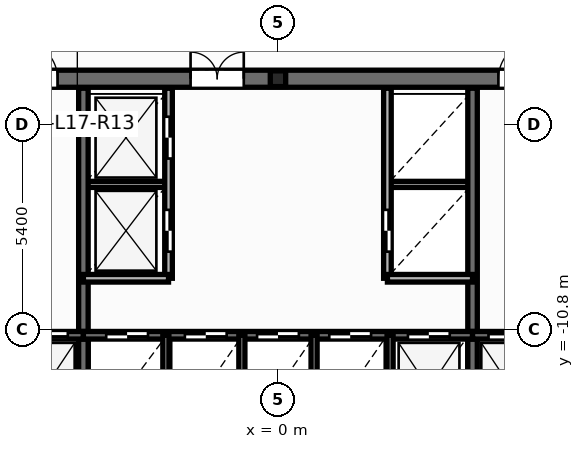
"""IFC4 building model, lengths in metres.
Left out: names, types, materials, properties, quantities, classifications, styles, units other than length and angle.
Written with IfcOpenShell. Run it as: python <this file> out.ifc"""

import sys

from ifc_helpers import new_model, si_unit, direction, frame, frame_2d, origin, origin_2d, place, context, subcontext, project, spatial, rectangle, i_section, extrude, element, fill, save


model = new_model("IFC4")
c1 = context("Model", 3, precision=1e-05, world=origin(), true_north=direction((0.0, 1.0)))
c2 = subcontext(c1, "Body", "Model", "MODEL_VIEW")
j1 = project(units=[si_unit("LENGTHUNIT", "METRE"), si_unit("PLANEANGLEUNIT", "RADIAN")], contexts=[c1])
p1 = place(None, origin())
s1 = spatial("IfcSite", under=j1, at=p1, CompositionType="ELEMENT")
p2 = place(p1, origin())
s2 = spatial("IfcBuilding", under=s1, at=p2, CompositionType="ELEMENT")
p3 = place(p2, frame((0.0, 0.0, 68.4)))
s3 = spatial("IfcBuildingStorey", under=s2, at=p3, CompositionType="ELEMENT", Elevation=68.4)
p4 = place(p3, frame((0.0, -4.2, 0.0), z_axis=(0.0, 0.0, 1.0), x_axis=(1.0, 0.0, 0.0)))
e1 = element("IfcColumn", 1, at=p4, inside=s3, PredefinedType="PILASTER", context=c2, shape_type="SweptSolid", body=[
    extrude(i_section(OverallWidth=0.405, OverallDepth=0.414, WebThickness=0.022, FlangeThickness=0.032, at=origin_2d()), origin(), (0.0, 0.0, 1.0), 3.6),
])
for number, where, z_axis, x_axis in (
    (2, (-5.12, -6.98, 0.0), (0.0, 0.0, 1.0), (1.0, 0.0, 0.0)),
    (3, (2.88, -6.98, 0.0), (0.0, 0.0, 1.0), (1.0, 0.0, 0.0)),
):
    element("IfcWall", number, at=place(p3, frame(where, z_axis=z_axis, x_axis=x_axis)), inside=s3, PredefinedType="PARTITIONING", context=c2, shape_type="SweptSolid", body=[
        extrude(rectangle(XDim=2.24, YDim=0.16, at=frame_2d((1.12, 0.0))), origin(), (0.0, 0.0, 1.0), 3.35),
    ])
p5 = place(p3, frame((-12.65, -4.2, 0.0), z_axis=(0.0, 0.0, 1.0), x_axis=(1.0, 0.0, 0.0)))
e4 = element("IfcWall", 4, at=p5, inside=s3, PredefinedType="SHEAR", context=c2, shape_type="SweptSolid", body=[
    extrude(rectangle(XDim=25.3, YDim=0.45, at=frame_2d((12.65, 0.0))), origin(), (0.0, 0.0, 1.0), 3.6),
])
p6 = place(p5, frame((0.95, 0.0, 0.0)))
e5 = element("IfcOpeningElement", 5, at=p6, cuts=e4, PredefinedType="OPENING", context=c2, shape_type="SweptSolid", body=[
    extrude(rectangle(XDim=0.756, YDim=2.054, at=frame_2d((0.375, 1.027))), frame((0.0, 0.235, 0.0), z_axis=(0.0, -1.0, 0.0), x_axis=(1.0, 0.0, 0.0)), (0.0, 0.0, 1.0), 0.47),
])
p7 = place(p5, frame((2.6, 0.0, 0.0)))
e6 = element("IfcOpeningElement", 6, at=p7, cuts=e4, PredefinedType="OPENING", context=c2, shape_type="SweptSolid", body=[
    extrude(rectangle(XDim=0.756, YDim=2.054, at=frame_2d((0.375, 1.027))), frame((0.0, 0.235, 0.0), z_axis=(0.0, -1.0, 0.0), x_axis=(1.0, 0.0, 0.0)), (0.0, 0.0, 1.0), 0.47),
])
p8 = place(p5, frame((21.85, 0.0, 0.0)))
e7 = element("IfcOpeningElement", 7, at=p8, cuts=e4, PredefinedType="OPENING", context=c2, shape_type="SweptSolid", body=[
    extrude(rectangle(XDim=0.756, YDim=2.054, at=frame_2d((0.375, 1.027))), frame((0.0, 0.235, 0.0), z_axis=(0.0, -1.0, 0.0), x_axis=(1.0, 0.0, 0.0)), (0.0, 0.0, 1.0), 0.47),
])
p9 = place(p5, frame((23.5, 0.0, 0.0)))
e8 = element("IfcOpeningElement", 8, at=p9, cuts=e4, PredefinedType="OPENING", context=c2, shape_type="SweptSolid", body=[
    extrude(rectangle(XDim=0.756, YDim=2.054, at=frame_2d((0.375, 1.027))), frame((0.0, 0.235, 0.0), z_axis=(0.0, -1.0, 0.0), x_axis=(1.0, 0.0, 0.0)), (0.0, 0.0, 1.0), 0.47),
])
p10 = place(p5, frame((5.85, 0.0, 0.0)))
e9 = element("IfcOpeningElement", 9, at=p10, cuts=e4, PredefinedType="OPENING", context=c2, shape_type="SweptSolid", body=[
    extrude(rectangle(XDim=1.006, YDim=2.104, at=frame_2d((0.5, 1.052))), frame((0.0, 0.235, 0.0), z_axis=(0.0, -1.0, 0.0), x_axis=(1.0, 0.0, 0.0)), (0.0, 0.0, 1.0), 0.47),
])
p11 = place(p5, frame((10.35, 0.0, 0.0)))
e10 = element("IfcOpeningElement", 10, at=p11, cuts=e4, PredefinedType="OPENING", context=c2, shape_type="SweptSolid", body=[
    extrude(rectangle(XDim=1.406, YDim=2.154, at=frame_2d((0.7, 1.077))), frame((0.0, 0.235, 0.0), z_axis=(0.0, -1.0, 0.0), x_axis=(1.0, 0.0, 0.0)), (0.0, 0.0, 1.0), 0.47),
])
p12 = place(p5, frame((18.45, 0.0, 0.0)))
e11 = element("IfcOpeningElement", 11, at=p12, cuts=e4, PredefinedType="OPENING", context=c2, shape_type="SweptSolid", body=[
    extrude(rectangle(XDim=1.006, YDim=2.104, at=frame_2d((0.5, 1.052))), frame((0.0, 0.235, 0.0), z_axis=(0.0, -1.0, 0.0), x_axis=(1.0, 0.0, 0.0)), (0.0, 0.0, 1.0), 0.47),
])
for number, where, z_axis, x_axis in (
    (12, (-5.12, -13.85, 0.0), (0.0, 0.0, 1.0), (0.0, 1.0, 0.0)),
    (13, (5.12, -13.85, 0.0), (0.0, 0.0, 1.0), (0.0, 1.0, 0.0)),
):
    element("IfcWall", number, at=place(p3, frame(where, z_axis=z_axis, x_axis=x_axis)), inside=s3, PredefinedType="SHEAR", context=c2, shape_type="SweptSolid", body=[
        extrude(rectangle(XDim=9.4, YDim=0.25, at=frame_2d((4.7, 0.0))), origin(), (0.0, 0.0, 1.0), 3.6),
    ])
p13 = place(p3, frame((-8.48, -10.95, 0.0), z_axis=(0.0, 0.0, 1.0), x_axis=(1.0, 0.0, 0.0)))
e14 = element("IfcWall", 14, at=p13, inside=s3, PredefinedType="SOLIDWALL", context=c2, shape_type="SweptSolid", body=[
    extrude(rectangle(XDim=3.36, YDim=0.2, at=frame_2d((1.68, 0.0))), origin(), (0.0, 0.0, 1.0), 3.6),
])
p14 = place(p13, frame((0.28, 0.0, 0.0)))
e15 = element("IfcOpeningElement", 15, at=p14, cuts=e14, PredefinedType="OPENING", context=c2, shape_type="SweptSolid", body=[
    extrude(rectangle(XDim=0.756, YDim=2.054, at=frame_2d((0.375, 1.027))), frame((0.0, 0.11, 0.0), z_axis=(0.0, -1.0, 0.0), x_axis=(1.0, 0.0, 0.0)), (0.0, 0.0, 1.0), 0.22),
])
p15 = place(p13, frame((1.85, 0.0, 0.0)))
e16 = element("IfcOpeningElement", 16, at=p15, cuts=e14, PredefinedType="OPENING", context=c2, shape_type="SweptSolid", body=[
    extrude(rectangle(XDim=1.106, YDim=2.104, at=frame_2d((0.55, 1.052))), frame((0.0, 0.11, 0.0), z_axis=(0.0, -1.0, 0.0), x_axis=(1.0, 0.0, 0.0)), (0.0, 0.0, 1.0), 0.22),
])
p16 = place(p3, frame((-5.12, -10.95, 0.0), z_axis=(0.0, 0.0, 1.0), x_axis=(1.0, 0.0, 0.0)))
e17 = element("IfcWall", 17, at=p16, inside=s3, PredefinedType="SOLIDWALL", context=c2, shape_type="SweptSolid", body=[
    extrude(rectangle(XDim=10.24, YDim=0.2, at=frame_2d((5.12, 0.0))), origin(), (0.0, 0.0, 1.0), 3.6),
])
p17 = place(p16, frame((0.6, 0.0, 0.0)))
e18 = element("IfcOpeningElement", 18, at=p17, cuts=e17, PredefinedType="OPENING", context=c2, shape_type="SweptSolid", body=[
    extrude(rectangle(XDim=1.106, YDim=2.104, at=frame_2d((0.55, 1.052))), frame((0.0, 0.11, 0.0), z_axis=(0.0, -1.0, 0.0), x_axis=(1.0, 0.0, 0.0)), (0.0, 0.0, 1.0), 0.22),
])
p18 = place(p16, frame((2.67, 0.0, 0.0)))
e19 = element("IfcOpeningElement", 19, at=p18, cuts=e17, PredefinedType="OPENING", context=c2, shape_type="SweptSolid", body=[
    extrude(rectangle(XDim=1.106, YDim=2.104, at=frame_2d((0.55, 1.052))), frame((0.0, 0.11, 0.0), z_axis=(0.0, -1.0, 0.0), x_axis=(1.0, 0.0, 0.0)), (0.0, 0.0, 1.0), 0.22),
])
p19 = place(p16, frame((4.57, 0.0, 0.0)))
e20 = element("IfcOpeningElement", 20, at=p19, cuts=e17, PredefinedType="OPENING", context=c2, shape_type="SweptSolid", body=[
    extrude(rectangle(XDim=1.106, YDim=2.104, at=frame_2d((0.55, 1.052))), frame((0.0, 0.11, 0.0), z_axis=(0.0, -1.0, 0.0), x_axis=(1.0, 0.0, 0.0)), (0.0, 0.0, 1.0), 0.22),
])
p20 = place(p16, frame((6.47, 0.0, 0.0)))
e21 = element("IfcOpeningElement", 21, at=p20, cuts=e17, PredefinedType="OPENING", context=c2, shape_type="SweptSolid", body=[
    extrude(rectangle(XDim=1.106, YDim=2.104, at=frame_2d((0.55, 1.052))), frame((0.0, 0.11, 0.0), z_axis=(0.0, -1.0, 0.0), x_axis=(1.0, 0.0, 0.0)), (0.0, 0.0, 1.0), 0.22),
])
p21 = place(p16, frame((8.54, 0.0, 0.0)))
e22 = element("IfcOpeningElement", 22, at=p21, cuts=e17, PredefinedType="OPENING", context=c2, shape_type="SweptSolid", body=[
    extrude(rectangle(XDim=1.106, YDim=2.104, at=frame_2d((0.55, 1.052))), frame((0.0, 0.11, 0.0), z_axis=(0.0, -1.0, 0.0), x_axis=(1.0, 0.0, 0.0)), (0.0, 0.0, 1.0), 0.22),
])
p22 = place(p3, frame((5.12, -10.95, 0.0), z_axis=(0.0, 0.0, 1.0), x_axis=(1.0, 0.0, 0.0)))
e23 = element("IfcWall", 23, at=p22, inside=s3, PredefinedType="SOLIDWALL", context=c2, shape_type="SweptSolid", body=[
    extrude(rectangle(XDim=3.36, YDim=0.2, at=frame_2d((1.68, 0.0))), origin(), (0.0, 0.0, 1.0), 3.6),
])
p23 = place(p22, frame((0.42, 0.0, 0.0)))
e24 = element("IfcOpeningElement", 24, at=p23, cuts=e23, PredefinedType="OPENING", context=c2, shape_type="SweptSolid", body=[
    extrude(rectangle(XDim=1.106, YDim=2.104, at=frame_2d((0.55, 1.052))), frame((0.0, 0.11, 0.0), z_axis=(0.0, -1.0, 0.0), x_axis=(1.0, 0.0, 0.0)), (0.0, 0.0, 1.0), 0.22),
])
p24 = place(p22, frame((2.3, 0.0, 0.0)))
e25 = element("IfcOpeningElement", 25, at=p24, cuts=e23, PredefinedType="OPENING", context=c2, shape_type="SweptSolid", body=[
    extrude(rectangle(XDim=0.756, YDim=2.054, at=frame_2d((0.375, 1.027))), frame((0.0, 0.11, 0.0), z_axis=(0.0, -1.0, 0.0), x_axis=(1.0, 0.0, 0.0)), (0.0, 0.0, 1.0), 0.22),
])
for number, where, z_axis, x_axis in (
    (26, (-2.95, -13.85, 0.0), (0.0, 0.0, 1.0), (0.0, 1.0, 0.0)),
    (27, (2.95, -13.85, 0.0), (0.0, 0.0, 1.0), (0.0, 1.0, 0.0)),
):
    element("IfcWall", number, at=place(p3, frame(where, z_axis=z_axis, x_axis=x_axis)), inside=s3, PredefinedType="PARTITIONING", context=c2, shape_type="SweptSolid", body=[
        extrude(rectangle(XDim=2.9, YDim=0.16, at=frame_2d((1.45, 0.0))), origin(), (0.0, 0.0, 1.0), 2.375),
    ])
p25 = place(p3, frame((-2.88, -9.45, 0.0), z_axis=(0.0, 0.0, 1.0), x_axis=(0.0, 1.0, 0.0)))
e28 = element("IfcWall", 28, at=p25, inside=s3, PredefinedType="SOLIDWALL", context=c2, shape_type="SweptSolid", body=[
    extrude(rectangle(XDim=5.0, YDim=0.2, at=frame_2d((2.5, 0.0))), origin(), (0.0, 0.0, 1.0), 3.35),
])
p26 = place(p25, frame((0.7, 0.0, 0.0)))
e29 = element("IfcOpeningElement", 29, at=p26, cuts=e28, PredefinedType="OPENING", context=c2, shape_type="SweptSolid", body=[
    extrude(rectangle(XDim=1.106, YDim=2.104, at=frame_2d((0.55, 1.052))), frame((0.0, 0.11, 0.0), z_axis=(0.0, -1.0, 0.0), x_axis=(1.0, 0.0, 0.0)), (0.0, 0.0, 1.0), 0.22),
])
p27 = place(p25, frame((3.15, 0.0, 0.0)))
e30 = element("IfcOpeningElement", 30, at=p27, cuts=e28, PredefinedType="OPENING", context=c2, shape_type="SweptSolid", body=[
    extrude(rectangle(XDim=1.106, YDim=2.104, at=frame_2d((0.55, 1.052))), frame((0.0, 0.11, 0.0), z_axis=(0.0, -1.0, 0.0), x_axis=(1.0, 0.0, 0.0)), (0.0, 0.0, 1.0), 0.22),
])
p28 = place(p3, frame((-5.12, -9.45, 0.0), z_axis=(0.0, 0.0, 1.0), x_axis=(1.0, 0.0, 0.0)))
e31 = element("IfcWall", 31, at=p28, inside=s3, PredefinedType="SOLIDWALL", context=c2, shape_type="SweptSolid", body=[
    extrude(rectangle(XDim=2.24, YDim=0.2, at=frame_2d((1.12, 0.0))), origin(), (0.0, 0.0, 1.0), 3.35),
])
p29 = place(p3, frame((2.88, -9.45, 0.0), z_axis=(0.0, 0.0, 1.0), x_axis=(0.0, 1.0, 0.0)))
e32 = element("IfcWall", 32, at=p29, inside=s3, PredefinedType="SOLIDWALL", context=c2, shape_type="SweptSolid", body=[
    extrude(rectangle(XDim=5.0, YDim=0.2, at=frame_2d((2.5, 0.0))), origin(), (0.0, 0.0, 1.0), 3.35),
])
p30 = place(p29, frame((0.7, 0.0, 0.0)))
e33 = element("IfcOpeningElement", 33, at=p30, cuts=e32, PredefinedType="OPENING", context=c2, shape_type="SweptSolid", body=[
    extrude(rectangle(XDim=1.106, YDim=2.104, at=frame_2d((0.55, 1.052))), frame((0.0, 0.11, 0.0), z_axis=(0.0, -1.0, 0.0), x_axis=(1.0, 0.0, 0.0)), (0.0, 0.0, 1.0), 0.22),
])
p31 = place(p3, frame((2.88, -9.45, 0.0), z_axis=(0.0, 0.0, 1.0), x_axis=(1.0, 0.0, 0.0)))
e34 = element("IfcWall", 34, at=p31, inside=s3, PredefinedType="SOLIDWALL", context=c2, shape_type="SweptSolid", body=[
    extrude(rectangle(XDim=2.24, YDim=0.2, at=frame_2d((1.12, 0.0))), origin(), (0.0, 0.0, 1.0), 3.35),
])
for number, where, z_axis, x_axis in (
    (35, (-0.95, -13.85, 0.0), (0.0, 0.0, 1.0), (0.0, 1.0, 0.0)),
    (36, (0.95, -13.85, 0.0), (0.0, 0.0, 1.0), (0.0, 1.0, 0.0)),
):
    element("IfcWall", number, at=place(p3, frame(where, z_axis=z_axis, x_axis=x_axis)), inside=s3, PredefinedType="PARTITIONING", context=c2, shape_type="SweptSolid", body=[
        extrude(rectangle(XDim=2.9, YDim=0.16, at=frame_2d((1.45, 0.0))), origin(), (0.0, 0.0, 1.0), 2.375),
    ])
p32 = place(p26, origin())
e37 = element("IfcDoor", 37, at=p32, inside=s3, OperationType="DOUBLE_DOOR_SLIDING", PredefinedType="DOOR", context=c2, shape_type="SweptSolid", body=[
    extrude(rectangle(XDim=1.1, YDim=2.1, at=frame_2d((0.55, 1.05))), frame((0.0, 0.025, 0.0), z_axis=(0.0, -1.0, 0.0), x_axis=(1.0, 0.0, 0.0)), (0.0, 0.0, 1.0), 0.05),
])
fill(e29, e37)
p33 = place(p27, origin())
e38 = element("IfcDoor", 38, at=p33, inside=s3, OperationType="DOUBLE_DOOR_SLIDING", PredefinedType="DOOR", context=c2, shape_type="SweptSolid", body=[
    extrude(rectangle(XDim=1.1, YDim=2.1, at=frame_2d((0.55, 1.05))), frame((0.0, 0.025, 0.0), z_axis=(0.0, -1.0, 0.0), x_axis=(1.0, 0.0, 0.0)), (0.0, 0.0, 1.0), 0.05),
])
fill(e30, e38)
p34 = place(p30, origin())
e39 = element("IfcDoor", 39, at=p34, inside=s3, OperationType="DOUBLE_DOOR_SLIDING", PredefinedType="DOOR", context=c2, shape_type="SweptSolid", body=[
    extrude(rectangle(XDim=1.1, YDim=2.1, at=frame_2d((0.55, 1.05))), frame((0.0, 0.025, 0.0), z_axis=(0.0, -1.0, 0.0), x_axis=(1.0, 0.0, 0.0)), (0.0, 0.0, 1.0), 0.05),
])
fill(e33, e39)
p35 = place(p15, origin())
e40 = element("IfcDoor", 40, at=p35, inside=s3, OperationType="DOUBLE_DOOR_SLIDING", PredefinedType="DOOR", context=c2, shape_type="SweptSolid", body=[
    extrude(rectangle(XDim=1.1, YDim=2.1, at=frame_2d((0.55, 1.05))), frame((0.0, 0.025, 0.0), z_axis=(0.0, -1.0, 0.0), x_axis=(1.0, 0.0, 0.0)), (0.0, 0.0, 1.0), 0.05),
])
fill(e16, e40)
p36 = place(p23, origin())
e41 = element("IfcDoor", 41, at=p36, inside=s3, OperationType="DOUBLE_DOOR_SLIDING", PredefinedType="DOOR", context=c2, shape_type="SweptSolid", body=[
    extrude(rectangle(XDim=1.1, YDim=2.1, at=frame_2d((0.55, 1.05))), frame((0.0, 0.025, 0.0), z_axis=(0.0, -1.0, 0.0), x_axis=(1.0, 0.0, 0.0)), (0.0, 0.0, 1.0), 0.05),
])
fill(e24, e41)
p37 = place(p17, origin())
e42 = element("IfcDoor", 42, at=p37, inside=s3, OperationType="DOUBLE_DOOR_SLIDING", PredefinedType="DOOR", context=c2, shape_type="SweptSolid", body=[
    extrude(rectangle(XDim=1.1, YDim=2.1, at=frame_2d((0.55, 1.05))), frame((0.0, 0.025, 0.0), z_axis=(0.0, -1.0, 0.0), x_axis=(1.0, 0.0, 0.0)), (0.0, 0.0, 1.0), 0.05),
])
fill(e18, e42)
p38 = place(p18, origin())
e43 = element("IfcDoor", 43, at=p38, inside=s3, OperationType="DOUBLE_DOOR_SLIDING", PredefinedType="DOOR", context=c2, shape_type="SweptSolid", body=[
    extrude(rectangle(XDim=1.1, YDim=2.1, at=frame_2d((0.55, 1.05))), frame((0.0, 0.025, 0.0), z_axis=(0.0, -1.0, 0.0), x_axis=(1.0, 0.0, 0.0)), (0.0, 0.0, 1.0), 0.05),
])
fill(e19, e43)
p39 = place(p19, origin())
e44 = element("IfcDoor", 44, at=p39, inside=s3, OperationType="DOUBLE_DOOR_SLIDING", PredefinedType="DOOR", context=c2, shape_type="SweptSolid", body=[
    extrude(rectangle(XDim=1.1, YDim=2.1, at=frame_2d((0.55, 1.05))), frame((0.0, 0.025, 0.0), z_axis=(0.0, -1.0, 0.0), x_axis=(1.0, 0.0, 0.0)), (0.0, 0.0, 1.0), 0.05),
])
fill(e20, e44)
p40 = place(p20, origin())
e45 = element("IfcDoor", 45, at=p40, inside=s3, OperationType="DOUBLE_DOOR_SLIDING", PredefinedType="DOOR", context=c2, shape_type="SweptSolid", body=[
    extrude(rectangle(XDim=1.1, YDim=2.1, at=frame_2d((0.55, 1.05))), frame((0.0, 0.025, 0.0), z_axis=(0.0, -1.0, 0.0), x_axis=(1.0, 0.0, 0.0)), (0.0, 0.0, 1.0), 0.05),
])
fill(e21, e45)
p41 = place(p21, origin())
e46 = element("IfcDoor", 46, at=p41, inside=s3, OperationType="DOUBLE_DOOR_SLIDING", PredefinedType="DOOR", context=c2, shape_type="SweptSolid", body=[
    extrude(rectangle(XDim=1.1, YDim=2.1, at=frame_2d((0.55, 1.05))), frame((0.0, 0.025, 0.0), z_axis=(0.0, -1.0, 0.0), x_axis=(1.0, 0.0, 0.0)), (0.0, 0.0, 1.0), 0.05),
])
fill(e22, e46)
p42 = place(p10, origin())
e47 = element("IfcDoor", 47, at=p42, inside=s3, OperationType="SINGLE_SWING_LEFT", PredefinedType="DOOR", context=c2, shape_type="SweptSolid", body=[
    extrude(rectangle(XDim=1.0, YDim=2.1, at=frame_2d((0.5, 1.05))), frame((0.0, 0.025, 0.0), z_axis=(0.0, -1.0, 0.0), x_axis=(1.0, 0.0, 0.0)), (0.0, 0.0, 1.0), 0.05),
])
fill(e9, e47)
p43 = place(p11, origin())
e48 = element("IfcDoor", 48, at=p43, inside=s3, OperationType="DOUBLE_DOOR_SINGLE_SWING", PredefinedType="DOOR", context=c2, shape_type="SweptSolid", body=[
    extrude(rectangle(XDim=1.4, YDim=2.15, at=frame_2d((0.7, 1.075))), frame((0.0, 0.025, 0.0), z_axis=(0.0, -1.0, 0.0), x_axis=(1.0, 0.0, 0.0)), (0.0, 0.0, 1.0), 0.05),
])
fill(e10, e48)
p44 = place(p12, origin())
e49 = element("IfcDoor", 49, at=p44, inside=s3, OperationType="SINGLE_SWING_RIGHT", PredefinedType="DOOR", context=c2, shape_type="SweptSolid", body=[
    extrude(rectangle(XDim=1.0, YDim=2.1, at=frame_2d((0.5, 1.05))), frame((0.0, 0.025, 0.0), z_axis=(0.0, -1.0, 0.0), x_axis=(1.0, 0.0, 0.0)), (0.0, 0.0, 1.0), 0.05),
])
fill(e11, e49)
save(model, sys.argv[1])
